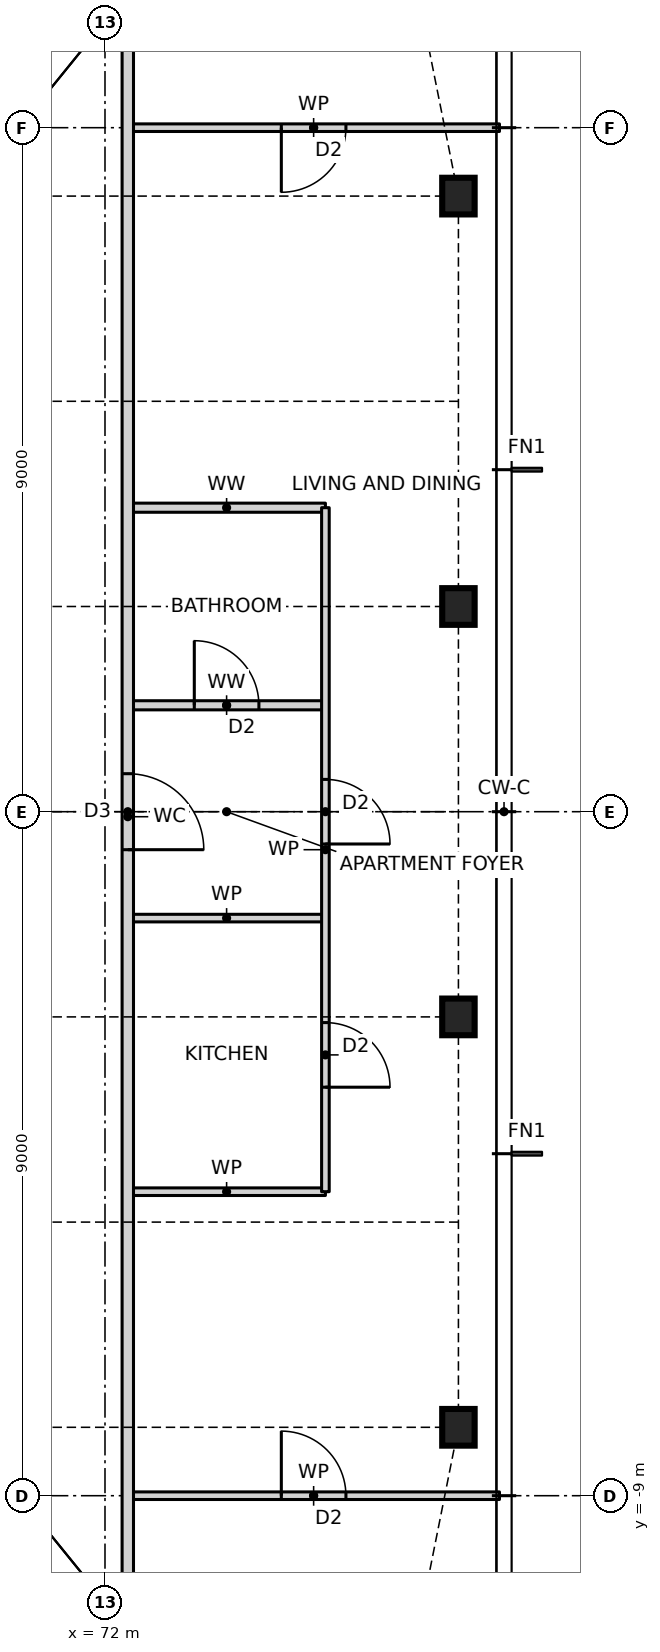
"""IFC4 building model, lengths in metres.
Left out: names, types, materials, properties, quantities, classifications, styles, units other than length and angle.
Written with IfcOpenShell. Run it as: python <this file> out.ifc"""

import sys

from ifc_helpers import new_model, si_unit, direction, frame, frame_2d, origin, origin_2d, place, context, subcontext, project, spatial, rectangle, i_section, extrude, element, fill, save


model = new_model("IFC4")
c1 = context("Model", 3, precision=1e-05, world=origin(), true_north=direction((0.0, 1.0)))
c2 = subcontext(c1, "Body", "Model", "MODEL_VIEW")
j1 = project(units=[si_unit("LENGTHUNIT", "METRE"), si_unit("PLANEANGLEUNIT", "RADIAN")], contexts=[c1])
p1 = place(None, origin())
s1 = spatial("IfcSite", under=j1, at=p1, CompositionType="ELEMENT")
p2 = place(p1, origin())
s2 = spatial("IfcBuilding", under=s1, at=p2, CompositionType="ELEMENT")
p3 = place(p2, frame((0.0, 0.0, 119.0)))
s3 = spatial("IfcBuildingStorey", under=s2, at=p3, CompositionType="ELEMENT", Elevation=119.0)
for number, where, z_axis, x_axis in (
    (1, (76.65, -8.1, 0.0), (0.0, 0.0, 1.0), (1.0, 0.0, 0.0)),
    (2, (76.65, -2.7, 0.0), (0.0, 0.0, 1.0), (1.0, 0.0, 0.0)),
    (3, (76.65, 2.7, 0.0), (0.0, 0.0, 1.0), (1.0, 0.0, 0.0)),
    (4, (76.65, 8.1, 0.0), (0.0, 0.0, 1.0), (1.0, 0.0, 0.0)),
):
    element("IfcColumn", number, at=place(p3, frame(where, z_axis=z_axis, x_axis=x_axis)), inside=s3, PredefinedType="COLUMN", context=c2, shape_type="SweptSolid", body=[
        extrude(i_section(OverallWidth=0.427, OverallDepth=0.483, WebThickness=0.051, FlangeThickness=0.082, at=origin_2d()), origin(), (0.0, 0.0, 1.0), 3.5),
    ])
p4 = place(p3, frame((72.3, -9.0, 0.0), z_axis=(0.0, 0.0, 1.0), x_axis=(1.0, 0.0, 0.0)))
e5 = element("IfcWall", 5, at=p4, inside=s3, PredefinedType="PARTITIONING", context=c2, shape_type="SweptSolid", body=[
    extrude(rectangle(XDim=4.89, YDim=0.1, at=frame_2d((2.445, 0.0))), origin(), (0.0, 0.0, 1.0), 3.27),
])
p5 = place(p4, frame((2.02, 0.0, 0.0)))
e6 = element("IfcOpeningElement", 6, at=p5, cuts=e5, PredefinedType="OPENING", context=c2, shape_type="SweptSolid", body=[
    extrude(rectangle(XDim=0.85, YDim=2.1, at=frame_2d((0.425, 1.05))), frame((0.0, 0.06, 0.0), z_axis=(0.0, -1.0, 0.0), x_axis=(1.0, 0.0, 0.0)), (0.0, 0.0, 1.0), 0.12),
])
for number, where, z_axis, x_axis in (
    (7, (72.3, -5.0, 0.0), (0.0, 0.0, 1.0), (1.0, 0.0, 0.0)),
    (8, (72.3, -1.4, 0.0), (0.0, 0.0, 1.0), (1.0, 0.0, 0.0)),
):
    element("IfcWall", number, at=place(p3, frame(where, z_axis=z_axis, x_axis=x_axis)), inside=s3, PredefinedType="PARTITIONING", context=c2, shape_type="SweptSolid", body=[
        extrude(rectangle(XDim=2.6, YDim=0.1, at=frame_2d((1.3, 0.0))), origin(), (0.0, 0.0, 1.0), 3.27),
    ])
p6 = place(p3, frame((72.3, 1.4, 0.0), z_axis=(0.0, 0.0, 1.0), x_axis=(1.0, 0.0, 0.0)))
e9 = element("IfcWall", 9, at=p6, inside=s3, PredefinedType="PARTITIONING", context=c2, shape_type="SweptSolid", body=[
    extrude(rectangle(XDim=2.6, YDim=0.12, at=frame_2d((1.3, 0.0))), origin(), (0.0, 0.0, 1.0), 3.27),
])
p7 = place(p6, frame((0.875, 0.0, 0.0)))
e10 = element("IfcOpeningElement", 10, at=p7, cuts=e9, PredefinedType="OPENING", context=c2, shape_type="SweptSolid", body=[
    extrude(rectangle(XDim=0.85, YDim=2.1, at=frame_2d((0.425, 1.05))), frame((0.0, 0.07, 0.0), z_axis=(0.0, -1.0, 0.0), x_axis=(1.0, 0.0, 0.0)), (0.0, 0.0, 1.0), 0.14),
])
p8 = place(p3, frame((72.3, 4.0, 0.0), z_axis=(0.0, 0.0, 1.0), x_axis=(1.0, 0.0, 0.0)))
e11 = element("IfcWall", 11, at=p8, inside=s3, PredefinedType="PARTITIONING", context=c2, shape_type="SweptSolid", body=[
    extrude(rectangle(XDim=2.6, YDim=0.12, at=frame_2d((1.3, 0.0))), origin(), (0.0, 0.0, 1.0), 3.27),
])
p9 = place(p3, frame((72.3, 9.0, 0.0), z_axis=(0.0, 0.0, 1.0), x_axis=(1.0, 0.0, 0.0)))
e12 = element("IfcWall", 12, at=p9, inside=s3, PredefinedType="PARTITIONING", context=c2, shape_type="SweptSolid", body=[
    extrude(rectangle(XDim=4.89, YDim=0.1, at=frame_2d((2.445, 0.0))), origin(), (0.0, 0.0, 1.0), 3.27),
])
p10 = place(p9, frame((2.02, 0.0, 0.0)))
e13 = element("IfcOpeningElement", 13, at=p10, cuts=e12, PredefinedType="OPENING", context=c2, shape_type="SweptSolid", body=[
    extrude(rectangle(XDim=0.85, YDim=2.1, at=frame_2d((0.425, 1.05))), frame((0.0, 0.06, 0.0), z_axis=(0.0, -1.0, 0.0), x_axis=(1.0, 0.0, 0.0)), (0.0, 0.0, 1.0), 0.12),
])
p11 = place(p3, frame((74.9, -5.0, 0.0), z_axis=(0.0, 0.0, 1.0), x_axis=(0.0, 1.0, 0.0)))
e14 = element("IfcWall", 14, at=p11, inside=s3, PredefinedType="PARTITIONING", context=c2, shape_type="SweptSolid", body=[
    extrude(rectangle(XDim=9.0, YDim=0.1, at=frame_2d((4.5, 0.0))), origin(), (0.0, 0.0, 1.0), 3.27),
])
p12 = place(p11, frame((1.375, 0.0, 0.0)))
e15 = element("IfcOpeningElement", 15, at=p12, cuts=e14, PredefinedType="OPENING", context=c2, shape_type="SweptSolid", body=[
    extrude(rectangle(XDim=0.85, YDim=2.1, at=frame_2d((0.425, 1.05))), frame((0.0, 0.06, 0.0), z_axis=(0.0, -1.0, 0.0), x_axis=(1.0, 0.0, 0.0)), (0.0, 0.0, 1.0), 0.12),
])
p13 = place(p11, frame((4.575, 0.0, 0.0)))
e16 = element("IfcOpeningElement", 16, at=p13, cuts=e14, PredefinedType="OPENING", context=c2, shape_type="SweptSolid", body=[
    extrude(rectangle(XDim=0.85, YDim=2.1, at=frame_2d((0.425, 1.05))), frame((0.0, 0.06, 0.0), z_axis=(0.0, -1.0, 0.0), x_axis=(1.0, 0.0, 0.0)), (0.0, 0.0, 1.0), 0.12),
])
p14 = place(p3, frame((72.3, -10.9, 0.0), z_axis=(0.0, 0.0, 1.0), x_axis=(0.0, 1.0, 0.0)))
e17 = element("IfcWall", 17, at=p14, inside=s3, PredefinedType="PARTITIONING", context=c2, shape_type="SweptSolid", body=[
    extrude(rectangle(XDim=21.668, YDim=0.15, at=frame_2d((10.834, 0.0))), origin(), (0.0, 0.0, 1.0), 3.27),
])
p15 = place(p14, frame((10.4, 0.0, 0.0)))
e18 = element("IfcOpeningElement", 18, at=p15, cuts=e17, PredefinedType="OPENING", context=c2, shape_type="SweptSolid", body=[
    extrude(rectangle(XDim=1.0, YDim=2.1, at=frame_2d((0.5, 1.05))), frame((0.0, 0.085, 0.0), z_axis=(0.0, -1.0, 0.0), x_axis=(1.0, 0.0, 0.0)), (0.0, 0.0, 1.0), 0.17),
])
p16 = place(p12, frame((0.85, 0.0, 0.0), z_axis=(0.0, 0.0, 1.0), x_axis=(-1.0, 0.0, 0.0)))
e19 = element("IfcDoor", 19, at=p16, inside=s3, OperationType="SINGLE_SWING_RIGHT", PredefinedType="DOOR", context=c2, shape_type="SweptSolid", body=[
    extrude(rectangle(XDim=0.85, YDim=2.1, at=frame_2d((0.425, 1.05))), frame((0.0, 0.025, 0.0), z_axis=(0.0, -1.0, 0.0), x_axis=(1.0, 0.0, 0.0)), (0.0, 0.0, 1.0), 0.05),
])
fill(e15, e19)
p17 = place(p15, frame((1.0, 0.0, 0.0), z_axis=(0.0, 0.0, 1.0), x_axis=(-1.0, 0.0, 0.0)))
e20 = element("IfcDoor", 20, at=p17, inside=s3, OperationType="SINGLE_SWING_RIGHT", PredefinedType="DOOR", context=c2, shape_type="SweptSolid", body=[
    extrude(rectangle(XDim=1.0, YDim=2.1, at=frame_2d((0.5, 1.05))), frame((0.0, 0.025, 0.0), z_axis=(0.0, -1.0, 0.0), x_axis=(1.0, 0.0, 0.0)), (0.0, 0.0, 1.0), 0.05),
])
fill(e18, e20)
p18 = place(p13, frame((0.85, 0.0, 0.0), z_axis=(0.0, 0.0, 1.0), x_axis=(-1.0, 0.0, 0.0)))
e21 = element("IfcDoor", 21, at=p18, inside=s3, OperationType="SINGLE_SWING_RIGHT", PredefinedType="DOOR", context=c2, shape_type="SweptSolid", body=[
    extrude(rectangle(XDim=0.85, YDim=2.1, at=frame_2d((0.425, 1.05))), frame((0.0, 0.025, 0.0), z_axis=(0.0, -1.0, 0.0), x_axis=(1.0, 0.0, 0.0)), (0.0, 0.0, 1.0), 0.05),
])
fill(e16, e21)
p19 = place(p7, origin())
e22 = element("IfcDoor", 22, at=p19, inside=s3, OperationType="SINGLE_SWING_LEFT", PredefinedType="DOOR", context=c2, shape_type="SweptSolid", body=[
    extrude(rectangle(XDim=0.85, YDim=2.1, at=frame_2d((0.425, 1.05))), frame((0.0, 0.025, 0.0), z_axis=(0.0, -1.0, 0.0), x_axis=(1.0, 0.0, 0.0)), (0.0, 0.0, 1.0), 0.05),
])
fill(e10, e22)
p20 = place(p5, origin())
e23 = element("IfcDoor", 23, at=p20, inside=s3, OperationType="SINGLE_SWING_LEFT", PredefinedType="DOOR", context=c2, shape_type="SweptSolid", body=[
    extrude(rectangle(XDim=0.85, YDim=2.1, at=frame_2d((0.425, 1.05))), frame((0.0, 0.025, 0.0), z_axis=(0.0, -1.0, 0.0), x_axis=(1.0, 0.0, 0.0)), (0.0, 0.0, 1.0), 0.05),
])
fill(e6, e23)
p21 = place(p10, frame((0.85, 0.0, 0.0), z_axis=(0.0, 0.0, 1.0), x_axis=(-1.0, 0.0, 0.0)))
e24 = element("IfcDoor", 24, at=p21, inside=s3, OperationType="SINGLE_SWING_RIGHT", PredefinedType="DOOR", context=c2, shape_type="SweptSolid", body=[
    extrude(rectangle(XDim=0.85, YDim=2.1, at=frame_2d((0.425, 1.05))), frame((0.0, 0.025, 0.0), z_axis=(0.0, -1.0, 0.0), x_axis=(1.0, 0.0, 0.0)), (0.0, 0.0, 1.0), 0.05),
])
fill(e13, e24)
save(model, sys.argv[1])
